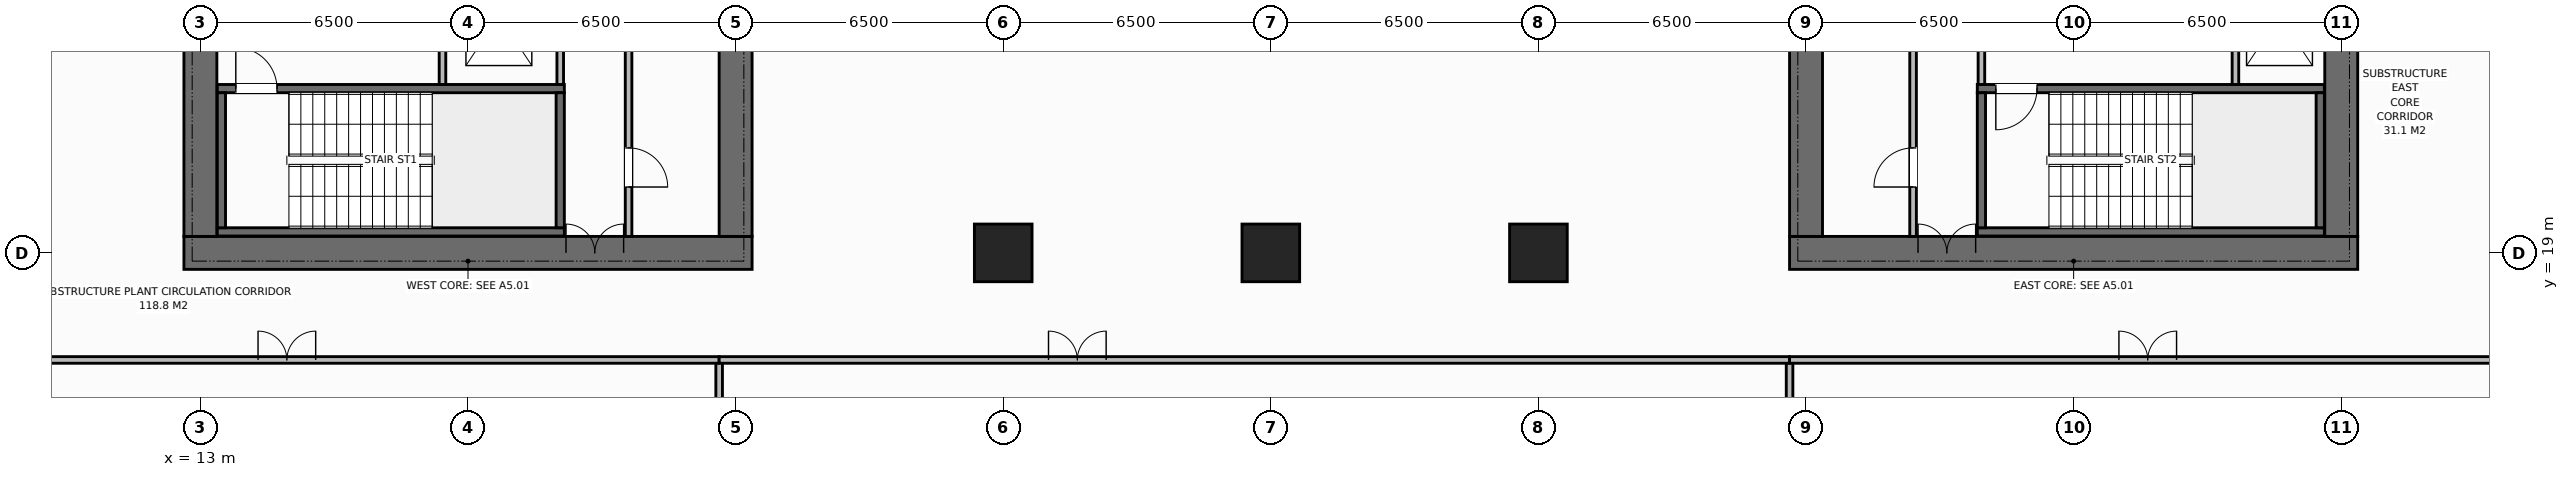
"""IFC4 building model, lengths in metres.
Left out: names, types, materials, properties, quantities, classifications, styles, units other than length and angle.
Written with IfcOpenShell. Run it as: python <this file> out.ifc"""

import sys

from ifc_helpers import new_model, si_unit, direction, frame, frame_2d, origin, origin_2d, place, context, subcontext, project, spatial, rectangle, extrude, element, fill, save


model = new_model("IFC4")
c1 = context("Model", 3, precision=1e-05, world=origin(), true_north=direction((0.0, 1.0)))
c2 = subcontext(c1, "Body", "Model", "MODEL_VIEW")
j1 = project(units=[si_unit("LENGTHUNIT", "METRE"), si_unit("PLANEANGLEUNIT", "RADIAN")], contexts=[c1])
p1 = place(None, origin())
s1 = spatial("IfcSite", under=j1, at=p1, CompositionType="ELEMENT")
p2 = place(p1, origin())
s2 = spatial("IfcBuilding", under=s1, at=p2, CompositionType="ELEMENT")
p3 = place(p2, frame((0.0, 0.0, -13.5)))
s3 = spatial("IfcBuildingStorey", under=s2, at=p3, CompositionType="ELEMENT", Elevation=-13.5)
p4 = place(p3, frame((12.6, 19.0, 0.0), z_axis=(0.0, 0.0, 1.0), x_axis=(1.0, 0.0, 0.0)))
e1 = element("IfcWall", 1, at=p4, inside=s3, PredefinedType="SHEAR", context=c2, shape_type="SweptSolid", body=[
    extrude(rectangle(XDim=13.8, YDim=0.8, at=frame_2d((6.9, 0.0))), origin(), (0.0, 0.0, 1.0), 4.5),
])
p5 = place(p4, frame((9.28, 0.0, 0.0)))
e2 = element("IfcOpeningElement", 2, at=p5, cuts=e1, PredefinedType="OPENING", context=c2, shape_type="SweptSolid", body=[
    extrude(rectangle(XDim=1.4, YDim=2.2, at=frame_2d((0.7, 1.1))), frame((0.0, 0.41, 0.0), z_axis=(0.0, -1.0, 0.0), x_axis=(1.0, 0.0, 0.0)), (0.0, 0.0, 1.0), 0.82),
])
p6 = place(p3, frame((13.0, 19.4, 0.0), z_axis=(0.0, 0.0, 1.0), x_axis=(0.0, 1.0, 0.0)))
e3 = element("IfcWall", 3, at=p6, inside=s3, PredefinedType="SHEAR", context=c2, shape_type="SweptSolid", body=[
    extrude(rectangle(XDim=13.2, YDim=0.8, at=frame_2d((6.6, 0.0))), origin(), (0.0, 0.0, 1.0), 4.5),
])
p7 = place(p6, frame((4.65, 0.0, 0.0)))
e4 = element("IfcOpeningElement", 4, at=p7, cuts=e3, PredefinedType="OPENING", context=c2, shape_type="SweptSolid", body=[
    extrude(rectangle(XDim=1.4, YDim=2.2, at=frame_2d((0.7, 1.1))), frame((0.0, 0.41, 0.0), z_axis=(0.0, -1.0, 0.0), x_axis=(1.0, 0.0, 0.0)), (0.0, 0.0, 1.0), 0.82),
])
p8 = place(p3, frame((26.0, 19.4, 0.0), z_axis=(0.0, 0.0, 1.0), x_axis=(0.0, 1.0, 0.0)))
e5 = element("IfcWall", 5, at=p8, inside=s3, PredefinedType="SHEAR", context=c2, shape_type="SweptSolid", body=[
    extrude(rectangle(XDim=13.2, YDim=0.8, at=frame_2d((6.6, 0.0))), origin(), (0.0, 0.0, 1.0), 4.5),
])
p9 = place(p3, frame((51.6, 19.0, 0.0), z_axis=(0.0, 0.0, 1.0), x_axis=(1.0, 0.0, 0.0)))
e6 = element("IfcWall", 6, at=p9, inside=s3, PredefinedType="SHEAR", context=c2, shape_type="SweptSolid", body=[
    extrude(rectangle(XDim=13.8, YDim=0.8, at=frame_2d((6.9, 0.0))), origin(), (0.0, 0.0, 1.0), 4.5),
])
p10 = place(p9, frame((3.12, 0.0, 0.0)))
e7 = element("IfcOpeningElement", 7, at=p10, cuts=e6, PredefinedType="OPENING", context=c2, shape_type="SweptSolid", body=[
    extrude(rectangle(XDim=1.4, YDim=2.2, at=frame_2d((0.7, 1.1))), frame((0.0, 0.41, 0.0), z_axis=(0.0, -1.0, 0.0), x_axis=(1.0, 0.0, 0.0)), (0.0, 0.0, 1.0), 0.82),
])
p11 = place(p3, frame((52.0, 19.4, 0.0), z_axis=(0.0, 0.0, 1.0), x_axis=(0.0, 1.0, 0.0)))
e8 = element("IfcWall", 8, at=p11, inside=s3, PredefinedType="SHEAR", context=c2, shape_type="SweptSolid", body=[
    extrude(rectangle(XDim=13.2, YDim=0.8, at=frame_2d((6.6, 0.0))), origin(), (0.0, 0.0, 1.0), 4.5),
])
p12 = place(p3, frame((65.0, 19.4, 0.0), z_axis=(0.0, 0.0, 1.0), x_axis=(0.0, 1.0, 0.0)))
e9 = element("IfcWall", 9, at=p12, inside=s3, PredefinedType="SHEAR", context=c2, shape_type="SweptSolid", body=[
    extrude(rectangle(XDim=13.2, YDim=0.8, at=frame_2d((6.6, 0.0))), origin(), (0.0, 0.0, 1.0), 4.5),
])
p13 = place(p12, frame((8.05, 0.0, 0.0)))
e10 = element("IfcOpeningElement", 10, at=p13, cuts=e9, PredefinedType="OPENING", context=c2, shape_type="SweptSolid", body=[
    extrude(rectangle(XDim=1.3, YDim=2.2, at=frame_2d((0.65, 1.1))), frame((0.0, 0.41, 0.0), z_axis=(0.0, -1.0, 0.0), x_axis=(1.0, 0.0, 0.0)), (0.0, 0.0, 1.0), 0.82),
])
p14 = place(p3, frame((13.41, 19.51, 0.0), z_axis=(0.0, 0.0, 1.0), x_axis=(1.0, 0.0, 0.0)))
e11 = element("IfcWall", 11, at=p14, inside=s3, PredefinedType="SHEAR", context=c2, shape_type="SweptSolid", body=[
    extrude(rectangle(XDim=8.43, YDim=0.2, at=frame_2d((4.215, 0.0))), origin(), (0.0, 0.0, 1.0), 4.5),
])
p15 = place(p3, frame((13.41, 22.99, 0.0), z_axis=(0.0, 0.0, 1.0), x_axis=(1.0, 0.0, 0.0)))
e12 = element("IfcWall", 12, at=p15, inside=s3, PredefinedType="SHEAR", context=c2, shape_type="SweptSolid", body=[
    extrude(rectangle(XDim=8.43, YDim=0.2, at=frame_2d((4.215, 0.0))), origin(), (0.0, 0.0, 1.0), 4.5),
])
p16 = place(p15, frame((0.45, 0.0, 0.0)))
e13 = element("IfcOpeningElement", 13, at=p16, cuts=e12, PredefinedType="OPENING", context=c2, shape_type="SweptSolid", body=[
    extrude(rectangle(XDim=1.0, YDim=2.15, at=frame_2d((0.5, 1.075))), frame((0.0, 0.11, 0.0), z_axis=(0.0, -1.0, 0.0), x_axis=(1.0, 0.0, 0.0)), (0.0, 0.0, 1.0), 0.22),
])
for number, where, z_axis, x_axis in (
    (14, (13.51, 19.61, 0.0), (0.0, 0.0, 1.0), (0.0, 1.0, 0.0)),
    (15, (21.74, 19.61, 0.0), (0.0, 0.0, 1.0), (0.0, 1.0, 0.0)),
):
    element("IfcWall", number, at=place(p3, frame(where, z_axis=z_axis, x_axis=x_axis)), inside=s3, PredefinedType="SHEAR", context=c2, shape_type="SweptSolid", body=[
        extrude(rectangle(XDim=3.28, YDim=0.2, at=frame_2d((1.64, 0.0))), origin(), (0.0, 0.0, 1.0), 4.5),
    ])
p17 = place(p3, frame((56.16, 19.51, 0.0), z_axis=(0.0, 0.0, 1.0), x_axis=(1.0, 0.0, 0.0)))
e16 = element("IfcWall", 16, at=p17, inside=s3, PredefinedType="SHEAR", context=c2, shape_type="SweptSolid", body=[
    extrude(rectangle(XDim=8.43, YDim=0.2, at=frame_2d((4.215, 0.0))), origin(), (0.0, 0.0, 1.0), 4.5),
])
p18 = place(p3, frame((56.16, 22.99, 0.0), z_axis=(0.0, 0.0, 1.0), x_axis=(1.0, 0.0, 0.0)))
e17 = element("IfcWall", 17, at=p18, inside=s3, PredefinedType="SHEAR", context=c2, shape_type="SweptSolid", body=[
    extrude(rectangle(XDim=8.43, YDim=0.2, at=frame_2d((4.215, 0.0))), origin(), (0.0, 0.0, 1.0), 4.5),
])
p19 = place(p18, frame((0.45, 0.0, 0.0)))
e18 = element("IfcOpeningElement", 18, at=p19, cuts=e17, PredefinedType="OPENING", context=c2, shape_type="SweptSolid", body=[
    extrude(rectangle(XDim=1.0, YDim=2.15, at=frame_2d((0.5, 1.075))), frame((0.0, 0.11, 0.0), z_axis=(0.0, -1.0, 0.0), x_axis=(1.0, 0.0, 0.0)), (0.0, 0.0, 1.0), 0.22),
])
for number, where, z_axis, x_axis in (
    (19, (56.26, 19.61, 0.0), (0.0, 0.0, 1.0), (0.0, 1.0, 0.0)),
    (20, (64.49, 19.61, 0.0), (0.0, 0.0, 1.0), (0.0, 1.0, 0.0)),
):
    element("IfcWall", number, at=place(p3, frame(where, z_axis=z_axis, x_axis=x_axis)), inside=s3, PredefinedType="SHEAR", context=c2, shape_type="SweptSolid", body=[
        extrude(rectangle(XDim=3.28, YDim=0.2, at=frame_2d((1.64, 0.0))), origin(), (0.0, 0.0, 1.0), 4.5),
    ])
for number, where, z_axis, x_axis in (
    (21, (32.5, 19.0, 0.0), (0.0, 0.0, 1.0), (1.0, 0.0, 0.0)),
    (22, (39.0, 19.0, 0.0), (0.0, 0.0, 1.0), (1.0, 0.0, 0.0)),
    (23, (45.5, 19.0, 0.0), (0.0, 0.0, 1.0), (1.0, 0.0, 0.0)),
):
    element("IfcColumn", number, at=place(p3, frame(where, z_axis=z_axis, x_axis=x_axis)), inside=s3, PredefinedType="COLUMN", context=c2, shape_type="SweptSolid", body=[
        extrude(rectangle(XDim=1.4, YDim=1.4, at=origin_2d()), origin(), (0.0, 0.0, 1.0), 4.5),
    ])
p20 = place(p3, frame((21.74, 23.09, 0.0), z_axis=(0.0, 0.0, 1.0), x_axis=(0.0, 1.0, 0.0)))
e24 = element("IfcWall", 24, at=p20, inside=s3, PredefinedType="STANDARD", context=c2, shape_type="SweptSolid", body=[
    extrude(rectangle(XDim=3.47, YDim=0.16, at=frame_2d((1.735, 0.0))), origin(), (0.0, 0.0, 1.0), 4.2),
])
p21 = place(p3, frame((18.88, 23.09, 0.0), z_axis=(0.0, 0.0, 1.0), x_axis=(0.0, 1.0, 0.0)))
e25 = element("IfcWall", 25, at=p21, inside=s3, PredefinedType="STANDARD", context=c2, shape_type="SweptSolid", body=[
    extrude(rectangle(XDim=3.47, YDim=0.16, at=frame_2d((1.735, 0.0))), origin(), (0.0, 0.0, 1.0), 4.2),
])
p22 = place(p21, frame((1.1, 0.0, 0.0)))
e26 = element("IfcOpeningElement", 26, at=p22, cuts=e25, PredefinedType="OPENING", context=c2, shape_type="SweptSolid", body=[
    extrude(rectangle(XDim=1.1, YDim=2.2, at=frame_2d((0.55, 1.1))), frame((0.0, 0.09, 0.0), z_axis=(0.0, -1.0, 0.0), x_axis=(1.0, 0.0, 0.0)), (0.0, 0.0, 1.0), 0.18),
])
p23 = place(p3, frame((23.4, 19.4, 0.0), z_axis=(0.0, 0.0, 1.0), x_axis=(0.0, 1.0, 0.0)))
e27 = element("IfcWall", 27, at=p23, inside=s3, PredefinedType="STANDARD", context=c2, shape_type="SweptSolid", body=[
    extrude(rectangle(XDim=13.2, YDim=0.16, at=frame_2d((6.6, 0.0))), origin(), (0.0, 0.0, 1.0), 4.2),
])
p24 = place(p23, frame((1.2, 0.0, 0.0)))
e28 = element("IfcOpeningElement", 28, at=p24, cuts=e27, PredefinedType="OPENING", context=c2, shape_type="SweptSolid", body=[
    extrude(rectangle(XDim=0.95, YDim=2.15, at=frame_2d((0.475, 1.075))), frame((0.0, 0.09, 0.0), z_axis=(0.0, -1.0, 0.0), x_axis=(1.0, 0.0, 0.0)), (0.0, 0.0, 1.0), 0.18),
])
p25 = place(p3, frame((54.6, 19.4, 0.0), z_axis=(0.0, 0.0, 1.0), x_axis=(0.0, 1.0, 0.0)))
e29 = element("IfcWall", 29, at=p25, inside=s3, PredefinedType="STANDARD", context=c2, shape_type="SweptSolid", body=[
    extrude(rectangle(XDim=13.2, YDim=0.16, at=frame_2d((6.6, 0.0))), origin(), (0.0, 0.0, 1.0), 4.2),
])
p26 = place(p25, frame((1.2, 0.0, 0.0)))
e30 = element("IfcOpeningElement", 30, at=p26, cuts=e29, PredefinedType="OPENING", context=c2, shape_type="SweptSolid", body=[
    extrude(rectangle(XDim=0.95, YDim=2.15, at=frame_2d((0.475, 1.075))), frame((0.0, 0.09, 0.0), z_axis=(0.0, -1.0, 0.0), x_axis=(1.0, 0.0, 0.0)), (0.0, 0.0, 1.0), 0.18),
])
p27 = place(p3, frame((56.26, 23.09, 0.0), z_axis=(0.0, 0.0, 1.0), x_axis=(0.0, 1.0, 0.0)))
e31 = element("IfcWall", 31, at=p27, inside=s3, PredefinedType="STANDARD", context=c2, shape_type="SweptSolid", body=[
    extrude(rectangle(XDim=9.51, YDim=0.16, at=frame_2d((4.755, 0.0))), origin(), (0.0, 0.0, 1.0), 4.2),
])
p28 = place(p27, frame((1.01, 0.0, 0.0)))
e32 = element("IfcOpeningElement", 32, at=p28, cuts=e31, PredefinedType="OPENING", context=c2, shape_type="SweptSolid", body=[
    extrude(rectangle(XDim=1.3, YDim=2.2, at=frame_2d((0.65, 1.1))), frame((0.0, 0.09, 0.0), z_axis=(0.0, -1.0, 0.0), x_axis=(1.0, 0.0, 0.0)), (0.0, 0.0, 1.0), 0.18),
])
p29 = place(p3, frame((62.43, 23.09, 0.0), z_axis=(0.0, 0.0, 1.0), x_axis=(0.0, 1.0, 0.0)))
e33 = element("IfcWall", 33, at=p29, inside=s3, PredefinedType="STANDARD", context=c2, shape_type="SweptSolid", body=[
    extrude(rectangle(XDim=3.47, YDim=0.16, at=frame_2d((1.735, 0.0))), origin(), (0.0, 0.0, 1.0), 4.2),
])
p30 = place(p29, frame((1.1, 0.0, 0.0)))
e34 = element("IfcOpeningElement", 34, at=p30, cuts=e33, PredefinedType="OPENING", context=c2, shape_type="SweptSolid", body=[
    extrude(rectangle(XDim=1.1, YDim=2.2, at=frame_2d((0.55, 1.1))), frame((0.0, 0.09, 0.0), z_axis=(0.0, -1.0, 0.0), x_axis=(1.0, 0.0, 0.0)), (0.0, 0.0, 1.0), 0.18),
])
for number, where, z_axis, x_axis in (
    (35, (25.6, 0.4, 0.0), (0.0, 0.0, 1.0), (0.0, 1.0, 0.0)),
    (36, (51.6, 0.4, 0.0), (0.0, 0.0, 1.0), (0.0, 1.0, 0.0)),
):
    element("IfcWall", number, at=place(p3, frame(where, z_axis=z_axis, x_axis=x_axis)), inside=s3, PredefinedType="STANDARD", context=c2, shape_type="SweptSolid", body=[
        extrude(rectangle(XDim=16.0, YDim=0.16, at=frame_2d((8.0, 0.0))), origin(), (0.0, 0.0, 1.0), 4.2),
    ])
p31 = place(p3, frame((0.4, 16.4, 0.0), z_axis=(0.0, 0.0, 1.0), x_axis=(1.0, 0.0, 0.0)))
e37 = element("IfcWall", 37, at=p31, inside=s3, PredefinedType="STANDARD", context=c2, shape_type="SweptSolid", body=[
    extrude(rectangle(XDim=25.2, YDim=0.16, at=frame_2d((12.6, 0.0))), origin(), (0.0, 0.0, 1.0), 4.2),
])
p32 = place(p31, frame((14.0, 0.0, 0.0)))
e38 = element("IfcOpeningElement", 38, at=p32, cuts=e37, PredefinedType="OPENING", context=c2, shape_type="SweptSolid", body=[
    extrude(rectangle(XDim=1.4, YDim=2.2, at=frame_2d((0.7, 1.1))), frame((0.0, 0.09, 0.0), z_axis=(0.0, -1.0, 0.0), x_axis=(1.0, 0.0, 0.0)), (0.0, 0.0, 1.0), 0.18),
])
p33 = place(p3, frame((25.6, 16.4, 0.0), z_axis=(0.0, 0.0, 1.0), x_axis=(1.0, 0.0, 0.0)))
e39 = element("IfcWall", 39, at=p33, inside=s3, PredefinedType="STANDARD", context=c2, shape_type="SweptSolid", body=[
    extrude(rectangle(XDim=26.0, YDim=0.16, at=frame_2d((13.0, 0.0))), origin(), (0.0, 0.0, 1.0), 4.2),
])
p34 = place(p33, frame((8.0, 0.0, 0.0)))
e40 = element("IfcOpeningElement", 40, at=p34, cuts=e39, PredefinedType="OPENING", context=c2, shape_type="SweptSolid", body=[
    extrude(rectangle(XDim=1.4, YDim=2.2, at=frame_2d((0.7, 1.1))), frame((0.0, 0.09, 0.0), z_axis=(0.0, -1.0, 0.0), x_axis=(1.0, 0.0, 0.0)), (0.0, 0.0, 1.0), 0.18),
])
p35 = place(p3, frame((51.6, 16.4, 0.0), z_axis=(0.0, 0.0, 1.0), x_axis=(1.0, 0.0, 0.0)))
e41 = element("IfcWall", 41, at=p35, inside=s3, PredefinedType="STANDARD", context=c2, shape_type="SweptSolid", body=[
    extrude(rectangle(XDim=26.0, YDim=0.16, at=frame_2d((13.0, 0.0))), origin(), (0.0, 0.0, 1.0), 4.2),
])
p36 = place(p35, frame((8.0, 0.0, 0.0)))
e42 = element("IfcOpeningElement", 42, at=p36, cuts=e41, PredefinedType="OPENING", context=c2, shape_type="SweptSolid", body=[
    extrude(rectangle(XDim=1.4, YDim=2.2, at=frame_2d((0.7, 1.1))), frame((0.0, 0.09, 0.0), z_axis=(0.0, -1.0, 0.0), x_axis=(1.0, 0.0, 0.0)), (0.0, 0.0, 1.0), 0.18),
])
p37 = place(p16, origin())
e43 = element("IfcDoor", 43, at=p37, inside=s3, OperationType="SINGLE_SWING_LEFT", PredefinedType="DOOR", context=c2, shape_type="SweptSolid", body=[
    extrude(rectangle(XDim=1.0, YDim=2.15, at=frame_2d((0.5, 1.075))), frame((0.0, 0.025, 0.0), z_axis=(0.0, -1.0, 0.0), x_axis=(1.0, 0.0, 0.0)), (0.0, 0.0, 1.0), 0.05),
])
fill(e13, e43)
p38 = place(p5, origin())
e44 = element("IfcDoor", 44, at=p38, inside=s3, OperationType="DOUBLE_DOOR_SINGLE_SWING", PredefinedType="DOOR", context=c2, shape_type="SweptSolid", body=[
    extrude(rectangle(XDim=1.4, YDim=2.2, at=frame_2d((0.7, 1.1))), frame((0.0, 0.125, 0.0), z_axis=(0.0, -1.0, 0.0), x_axis=(1.0, 0.0, 0.0)), (0.0, 0.0, 1.0), 0.05),
])
fill(e2, e44)
p39 = place(p24, origin())
e45 = element("IfcDoor", 45, at=p39, inside=s3, OperationType="SINGLE_SWING_RIGHT", PredefinedType="DOOR", context=c2, shape_type="SweptSolid", body=[
    extrude(rectangle(XDim=0.95, YDim=2.15, at=frame_2d((0.475, 1.075))), frame((0.0, 0.025, 0.0), z_axis=(0.0, -1.0, 0.0), x_axis=(1.0, 0.0, 0.0)), (0.0, 0.0, 1.0), 0.05),
])
fill(e28, e45)
p40 = place(p10, origin())
e46 = element("IfcDoor", 46, at=p40, inside=s3, OperationType="DOUBLE_DOOR_SINGLE_SWING", PredefinedType="DOOR", context=c2, shape_type="SweptSolid", body=[
    extrude(rectangle(XDim=1.4, YDim=2.2, at=frame_2d((0.7, 1.1))), frame((0.0, 0.125, 0.0), z_axis=(0.0, -1.0, 0.0), x_axis=(1.0, 0.0, 0.0)), (0.0, 0.0, 1.0), 0.05),
])
fill(e7, e46)
p41 = place(p26, origin())
e47 = element("IfcDoor", 47, at=p41, inside=s3, OperationType="SINGLE_SWING_LEFT", PredefinedType="DOOR", context=c2, shape_type="SweptSolid", body=[
    extrude(rectangle(XDim=0.95, YDim=2.15, at=frame_2d((0.475, 1.075))), frame((0.0, 0.025, 0.0), z_axis=(0.0, -1.0, 0.0), x_axis=(1.0, 0.0, 0.0)), (0.0, 0.0, 1.0), 0.05),
])
fill(e30, e47)
p42 = place(p19, origin())
e48 = element("IfcDoor", 48, at=p42, inside=s3, OperationType="SINGLE_SWING_RIGHT", PredefinedType="DOOR", context=c2, shape_type="SweptSolid", body=[
    extrude(rectangle(XDim=1.0, YDim=2.15, at=frame_2d((0.5, 1.075))), frame((0.0, 0.025, 0.0), z_axis=(0.0, -1.0, 0.0), x_axis=(1.0, 0.0, 0.0)), (0.0, 0.0, 1.0), 0.05),
])
fill(e18, e48)
p43 = place(p32, origin())
e49 = element("IfcDoor", 49, at=p43, inside=s3, OperationType="DOUBLE_DOOR_SINGLE_SWING", PredefinedType="DOOR", context=c2, shape_type="SweptSolid", body=[
    extrude(rectangle(XDim=1.4, YDim=2.2, at=frame_2d((0.7, 1.1))), frame((0.0, 0.025, 0.0), z_axis=(0.0, -1.0, 0.0), x_axis=(1.0, 0.0, 0.0)), (0.0, 0.0, 1.0), 0.05),
])
fill(e38, e49)
p44 = place(p34, origin())
e50 = element("IfcDoor", 50, at=p44, inside=s3, OperationType="DOUBLE_DOOR_SINGLE_SWING", PredefinedType="DOOR", context=c2, shape_type="SweptSolid", body=[
    extrude(rectangle(XDim=1.4, YDim=2.2, at=frame_2d((0.7, 1.1))), frame((0.0, 0.025, 0.0), z_axis=(0.0, -1.0, 0.0), x_axis=(1.0, 0.0, 0.0)), (0.0, 0.0, 1.0), 0.05),
])
fill(e40, e50)
p45 = place(p36, origin())
e51 = element("IfcDoor", 51, at=p45, inside=s3, OperationType="DOUBLE_DOOR_SINGLE_SWING", PredefinedType="DOOR", context=c2, shape_type="SweptSolid", body=[
    extrude(rectangle(XDim=1.4, YDim=2.2, at=frame_2d((0.7, 1.1))), frame((0.0, 0.025, 0.0), z_axis=(0.0, -1.0, 0.0), x_axis=(1.0, 0.0, 0.0)), (0.0, 0.0, 1.0), 0.05),
])
fill(e42, e51)
save(model, sys.argv[1])
